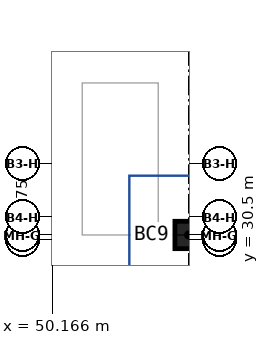
"""IFC4 building model, lengths in metres.
Left out: names, types, materials, properties, quantities, classifications, styles, units other than length and angle.
Written with IfcOpenShell. Run it as: python <this file> out.ifc"""

import sys

from ifc_helpers import new_model, si_unit, direction, frame, origin, origin_2d, place, context, subcontext, project, spatial, rectangle, extrude, source, transform, mapped, element, save


model = new_model("IFC4")
c1 = context("Model", 3, precision=1e-05, world=origin(), true_north=direction((0.0, 1.0)))
c2 = subcontext(c1, "Body", "Model", "MODEL_VIEW")
j1 = project(units=[si_unit("LENGTHUNIT", "METRE"), si_unit("PLANEANGLEUNIT", "RADIAN")], contexts=[c1])
p1 = place(None, origin())
s1 = spatial("IfcSite", under=j1, at=p1, CompositionType="ELEMENT")
p2 = place(p1, origin())
s2 = spatial("IfcBuilding", under=s1, at=p2, CompositionType="ELEMENT")
p3 = place(p2, frame((0.0, 0.0, -9.0)))
s3 = spatial("IfcBuildingStorey", under=s2, at=p3, CompositionType="ELEMENT", Elevation=-9.0)
m1 = source(origin(), c2, "Body", "SweptSolid", [
    extrude(rectangle(XDim=0.9, YDim=0.9, at=origin_2d()), origin(), (0.0, 0.0, 1.0), 4.5),
])
p4 = place(p3, frame((54.65, 30.65, 0.0), z_axis=(0.0, 0.0, 1.0), x_axis=(1.0, 0.0, 0.0)))
e1 = element("IfcColumn", 1, at=p4, inside=s3, PredefinedType="COLUMN", context=c2, shape_type="MappedRepresentation", body=[
    mapped(m1, transform((0.0, 0.0, 0.0))),
])
save(model, sys.argv[1])
